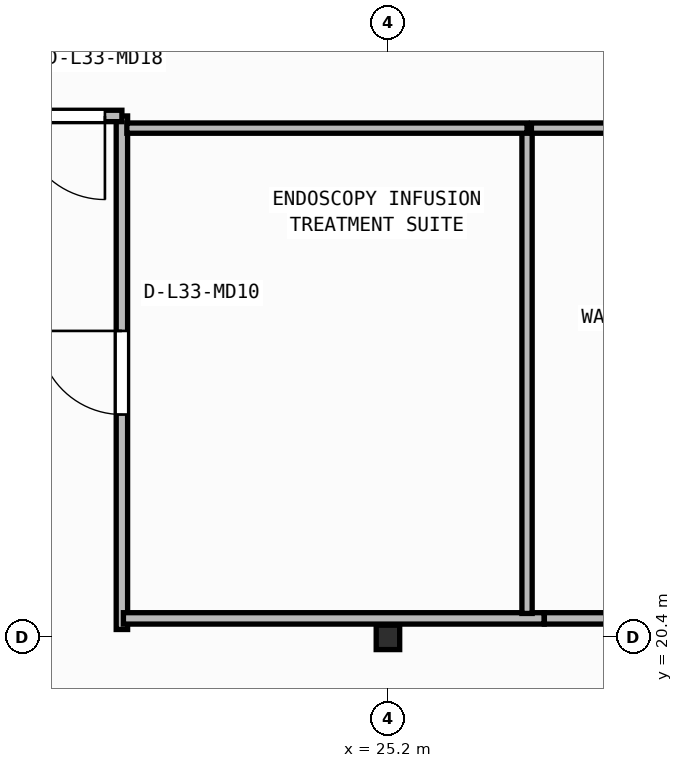
"""IFC4 building model, lengths in metres.
Left out: names, types, materials, properties, quantities, classifications, styles, units other than length and angle.
Written with IfcOpenShell. Run it as: python <this file> out.ifc"""

import sys

from ifc_helpers import new_model, si_unit, direction, frame, frame_2d, origin, origin_2d, place, context, subcontext, project, spatial, rectangle, i_section, extrude, element, fill, save


model = new_model("IFC4")
c1 = context("Model", 3, precision=1e-05, world=origin(), true_north=direction((0.0, 1.0)))
c2 = subcontext(c1, "Body", "Model", "MODEL_VIEW")
j1 = project(units=[si_unit("LENGTHUNIT", "METRE"), si_unit("PLANEANGLEUNIT", "RADIAN")], contexts=[c1])
p1 = place(None, origin())
s1 = spatial("IfcSite", under=j1, at=p1, CompositionType="ELEMENT")
p2 = place(p1, origin())
s2 = spatial("IfcBuilding", under=s1, at=p2, CompositionType="ELEMENT")
p3 = place(p2, frame((0.0, 0.0, 134.95)))
s3 = spatial("IfcBuildingStorey", under=s2, at=p3, CompositionType="ELEMENT", Elevation=134.95)
p4 = place(p3, frame((25.2, 20.4, 0.0), z_axis=(0.0, 0.0, 1.0), x_axis=(1.0, 0.0, 0.0)))
e1 = element("IfcColumn", 1, at=p4, inside=s3, PredefinedType="COLUMN", context=c2, shape_type="SweptSolid", body=[
    extrude(i_section(OverallWidth=0.309, OverallDepth=0.321, WebThickness=0.014, FlangeThickness=0.022, FilletRadius=0.017, at=origin_2d()), origin(), (0.0, 0.0, 1.0), 3.95),
])
p5 = place(p3, frame((21.7, 20.504, 0.0), z_axis=(0.0, 0.0, 1.0), x_axis=(0.0, 1.0, 0.0)))
e2 = element("IfcWall", 2, at=p5, inside=s3, PredefinedType="PARTITIONING", context=c2, shape_type="SweptSolid", body=[
    extrude(rectangle(XDim=6.756, YDim=0.15, at=frame_2d((3.378, 0.0))), origin(), (0.0, 0.0, 1.0), 3.71),
])
p6 = place(p5, frame((2.828, 0.0, 0.0)))
e3 = element("IfcOpeningElement", 3, at=p6, cuts=e2, PredefinedType="OPENING", context=c2, shape_type="SweptSolid", body=[
    extrude(rectangle(XDim=1.1, YDim=2.1, at=frame_2d((0.55, 1.05))), frame((0.0, 0.085, 0.0), z_axis=(0.0, -1.0, 0.0), x_axis=(1.0, 0.0, 0.0)), (0.0, 0.0, 1.0), 0.17),
])
p7 = place(p3, frame((21.7, 27.26, 0.0), z_axis=(0.0, 0.0, 1.0), x_axis=(-1.0, 0.0, 0.0)))
e4 = element("IfcWall", 4, at=p7, inside=s3, PredefinedType="PARTITIONING", context=c2, shape_type="SweptSolid", body=[
    extrude(rectangle(XDim=2.435, YDim=0.15, at=frame_2d((1.218, 0.0))), origin(), (0.0, 0.0, 1.0), 3.71),
])
p8 = place(p7, frame((0.223, 0.0, 0.0)))
e5 = element("IfcOpeningElement", 5, at=p8, cuts=e4, PredefinedType="OPENING", context=c2, shape_type="SweptSolid", body=[
    extrude(rectangle(XDim=1.1, YDim=2.1, at=frame_2d((0.55, 1.05))), frame((0.0, 0.085, 0.0), z_axis=(0.0, -1.0, 0.0), x_axis=(1.0, 0.0, 0.0)), (0.0, 0.0, 1.0), 0.17),
])
p9 = place(p3, frame((27.256, 20.65, 0.0), z_axis=(0.0, 0.0, 1.0), x_axis=(-1.0, 0.0, 0.0)))
e6 = element("IfcWall", 6, at=p9, inside=s3, PredefinedType="PARTITIONING", context=c2, shape_type="SweptSolid", body=[
    extrude(rectangle(XDim=5.536, YDim=0.15, at=frame_2d((2.768, 0.0))), origin(), (0.0, 0.0, 1.0), 3.083),
])
p10 = place(p3, frame((31.776, 20.65, 0.0), z_axis=(0.0, 0.0, 1.0), x_axis=(-1.0, 0.0, 0.0)))
e7 = element("IfcWall", 7, at=p10, inside=s3, PredefinedType="PARTITIONING", context=c2, shape_type="SweptSolid", body=[
    extrude(rectangle(XDim=4.518, YDim=0.15, at=frame_2d((2.259, 0.0))), origin(), (0.0, 0.0, 1.0), 3.083),
])
p11 = place(p10, frame((1.86, 0.0, 0.0)))
e8 = element("IfcOpeningElement", 8, at=p11, cuts=e7, PredefinedType="OPENING", context=c2, shape_type="SweptSolid", body=[
    extrude(rectangle(XDim=1.1, YDim=2.1, at=frame_2d((0.55, 1.05))), frame((0.0, 0.085, 0.0), z_axis=(0.0, -1.0, 0.0), x_axis=(1.0, 0.0, 0.0)), (0.0, 0.0, 1.0), 0.17),
])
p12 = place(p3, frame((27.03, 20.715, 0.0), z_axis=(0.0, 0.0, 1.0), x_axis=(0.0, 1.0, 0.0)))
e9 = element("IfcWall", 9, at=p12, inside=s3, PredefinedType="PARTITIONING", context=c2, shape_type="SweptSolid", body=[
    extrude(rectangle(XDim=6.385, YDim=0.135, at=frame_2d((3.192, 0.0))), origin(), (0.0, 0.0, 1.0), 3.71),
])
p13 = place(p3, frame((27.03, 27.1, 0.0), z_axis=(0.0, 0.0, 1.0), x_axis=(-1.0, 0.0, 0.0)))
e10 = element("IfcWall", 10, at=p13, inside=s3, PredefinedType="PARTITIONING", context=c2, shape_type="SweptSolid", body=[
    extrude(rectangle(XDim=5.265, YDim=0.135, at=frame_2d((2.633, 0.0))), origin(), (0.0, 0.0, 1.0), 3.71),
])
p14 = place(p3, frame((31.55, 27.1, 0.0), z_axis=(0.0, 0.0, 1.0), x_axis=(-1.0, 0.0, 0.0)))
e11 = element("IfcWall", 11, at=p14, inside=s3, PredefinedType="PARTITIONING", context=c2, shape_type="SweptSolid", body=[
    extrude(rectangle(XDim=4.463, YDim=0.135, at=frame_2d((2.231, 0.0))), origin(), (0.0, 0.0, 1.0), 3.71),
])
p15 = place(p6, origin())
e12 = element("IfcDoor", 12, at=p15, inside=s3, OperationType="SINGLE_SWING_RIGHT", PredefinedType="DOOR", context=c2, shape_type="SweptSolid", body=[
    extrude(rectangle(XDim=1.1, YDim=2.1, at=frame_2d((0.55, 1.05))), frame((0.0, 0.025, 0.0), z_axis=(0.0, -1.0, 0.0), x_axis=(1.0, 0.0, 0.0)), (0.0, 0.0, 1.0), 0.05),
])
fill(e3, e12)
p16 = place(p8, origin())
e13 = element("IfcDoor", 13, at=p16, inside=s3, OperationType="SINGLE_SWING_LEFT", PredefinedType="DOOR", context=c2, shape_type="SweptSolid", body=[
    extrude(rectangle(XDim=1.1, YDim=2.1, at=frame_2d((0.55, 1.05))), frame((0.0, 0.025, 0.0), z_axis=(0.0, -1.0, 0.0), x_axis=(1.0, 0.0, 0.0)), (0.0, 0.0, 1.0), 0.05),
])
fill(e5, e13)
save(model, sys.argv[1])
